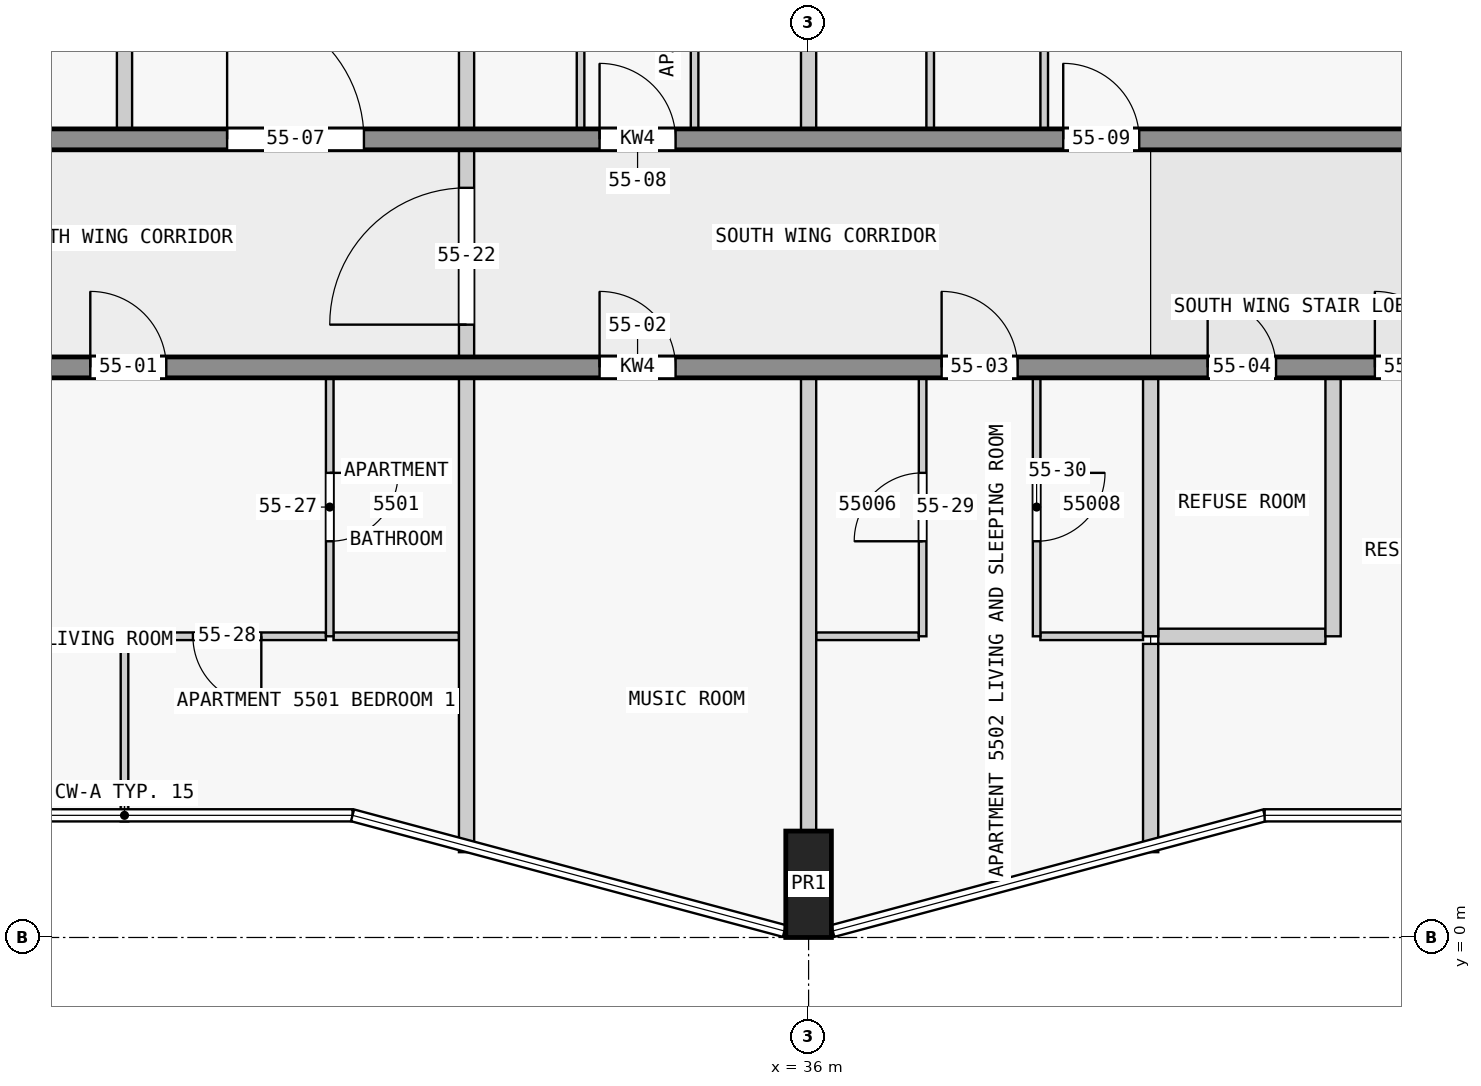
"""IFC4 building model, lengths in metres.
Left out: names, types, materials, properties, quantities, classifications, styles, units other than length and angle.
Written with IfcOpenShell. Run it as: python <this file> out.ifc"""

import sys

from ifc_helpers import new_model, si_unit, direction, frame, frame_2d, origin, origin_2d, place, context, subcontext, project, spatial, rectangle, extrude, element, fill, save


model = new_model("IFC4")
c1 = context("Model", 3, precision=1e-05, world=origin(), true_north=direction((0.0, 1.0)))
c2 = subcontext(c1, "Body", "Model", "MODEL_VIEW")
j1 = project(units=[si_unit("LENGTHUNIT", "METRE"), si_unit("PLANEANGLEUNIT", "RADIAN")], contexts=[c1])
p1 = place(None, origin())
s1 = spatial("IfcSite", under=j1, at=p1, CompositionType="ELEMENT")
p2 = place(p1, origin())
s2 = spatial("IfcBuilding", under=s1, at=p2, CompositionType="ELEMENT")
p3 = place(p2, frame((0.0, 0.0, 211.9)))
s3 = spatial("IfcBuildingStorey", under=s2, at=p3, CompositionType="ELEMENT", Elevation=211.9)
p4 = place(p3, frame((36.0, 0.7, 0.0), z_axis=(0.0, 0.0, 1.0), x_axis=(1.0, 0.0, 0.0)))
e1 = element("IfcColumn", 1, at=p4, inside=s3, PredefinedType="COLUMN", context=c2, shape_type="SweptSolid", body=[
    extrude(rectangle(XDim=0.6, YDim=1.4, at=origin_2d()), origin(), (0.0, 0.0, 1.0), 3.5),
])
p5 = place(p3, frame((22.5, 7.5, 0.0), z_axis=(0.0, 0.0, 1.0), x_axis=(1.0, 0.0, 0.0)))
e2 = element("IfcWall", 2, at=p5, inside=s3, PredefinedType="SHEAR", context=c2, shape_type="SweptSolid", body=[
    extrude(rectangle(XDim=22.5, YDim=0.275, at=frame_2d((11.25, 0.0))), origin(), (0.0, 0.0, 1.0), 3.25),
])
p6 = place(p5, frame((4.05, 0.0, 0.0)))
e3 = element("IfcOpeningElement", 3, at=p6, cuts=e2, PredefinedType="OPENING", context=c2, shape_type="SweptSolid", body=[
    extrude(rectangle(XDim=1.0, YDim=2.1, at=frame_2d((0.5, 1.05))), frame((0.0, 0.147, 0.0), z_axis=(0.0, -1.0, 0.0), x_axis=(1.0, 0.0, 0.0)), (0.0, 0.0, 1.0), 0.295),
])
p7 = place(p5, frame((10.75, 0.0, 0.0)))
e4 = element("IfcOpeningElement", 4, at=p7, cuts=e2, PredefinedType="OPENING", context=c2, shape_type="SweptSolid", body=[
    extrude(rectangle(XDim=1.0, YDim=2.1, at=frame_2d((0.5, 1.05))), frame((0.0, 0.147, 0.0), z_axis=(0.0, -1.0, 0.0), x_axis=(1.0, 0.0, 0.0)), (0.0, 0.0, 1.0), 0.295),
])
p8 = place(p5, frame((15.25, 0.0, 0.0)))
e5 = element("IfcOpeningElement", 5, at=p8, cuts=e2, PredefinedType="OPENING", context=c2, shape_type="SweptSolid", body=[
    extrude(rectangle(XDim=1.0, YDim=2.1, at=frame_2d((0.5, 1.05))), frame((0.0, 0.147, 0.0), z_axis=(0.0, -1.0, 0.0), x_axis=(1.0, 0.0, 0.0)), (0.0, 0.0, 1.0), 0.295),
])
p9 = place(p5, frame((18.75, 0.0, 0.0)))
e6 = element("IfcOpeningElement", 6, at=p9, cuts=e2, PredefinedType="OPENING", context=c2, shape_type="SweptSolid", body=[
    extrude(rectangle(XDim=0.9, YDim=2.1, at=frame_2d((0.45, 1.05))), frame((0.0, 0.147, 0.0), z_axis=(0.0, -1.0, 0.0), x_axis=(1.0, 0.0, 0.0)), (0.0, 0.0, 1.0), 0.295),
])
p10 = place(p5, frame((20.95, 0.0, 0.0)))
e7 = element("IfcOpeningElement", 7, at=p10, cuts=e2, PredefinedType="OPENING", context=c2, shape_type="SweptSolid", body=[
    extrude(rectangle(XDim=1.0, YDim=2.1, at=frame_2d((0.5, 1.05))), frame((0.0, 0.147, 0.0), z_axis=(0.0, -1.0, 0.0), x_axis=(1.0, 0.0, 0.0)), (0.0, 0.0, 1.0), 0.295),
])
p11 = place(p3, frame((22.5, 10.5, 0.0), z_axis=(0.0, 0.0, 1.0), x_axis=(1.0, 0.0, 0.0)))
e8 = element("IfcWall", 8, at=p11, inside=s3, PredefinedType="SHEAR", context=c2, shape_type="SweptSolid", body=[
    extrude(rectangle(XDim=22.5, YDim=0.275, at=frame_2d((11.25, 0.0))), origin(), (0.0, 0.0, 1.0), 3.25),
])
p12 = place(p11, frame((1.75, 0.0, 0.0)))
e9 = element("IfcOpeningElement", 9, at=p12, cuts=e8, PredefinedType="OPENING", context=c2, shape_type="SweptSolid", body=[
    extrude(rectangle(XDim=1.0, YDim=2.1, at=frame_2d((0.5, 1.05))), frame((0.0, 0.147, 0.0), z_axis=(0.0, -1.0, 0.0), x_axis=(1.0, 0.0, 0.0)), (0.0, 0.0, 1.0), 0.295),
])
p13 = place(p11, frame((5.85, 0.0, 0.0)))
e10 = element("IfcOpeningElement", 10, at=p13, cuts=e8, PredefinedType="OPENING", context=c2, shape_type="SweptSolid", body=[
    extrude(rectangle(XDim=1.8, YDim=2.1, at=frame_2d((0.9, 1.05))), frame((0.0, 0.147, 0.0), z_axis=(0.0, -1.0, 0.0), x_axis=(1.0, 0.0, 0.0)), (0.0, 0.0, 1.0), 0.295),
])
p14 = place(p11, frame((10.75, 0.0, 0.0)))
e11 = element("IfcOpeningElement", 11, at=p14, cuts=e8, PredefinedType="OPENING", context=c2, shape_type="SweptSolid", body=[
    extrude(rectangle(XDim=1.0, YDim=2.1, at=frame_2d((0.5, 1.05))), frame((0.0, 0.147, 0.0), z_axis=(0.0, -1.0, 0.0), x_axis=(1.0, 0.0, 0.0)), (0.0, 0.0, 1.0), 0.295),
])
p15 = place(p11, frame((16.85, 0.0, 0.0)))
e12 = element("IfcOpeningElement", 12, at=p15, cuts=e8, PredefinedType="OPENING", context=c2, shape_type="SweptSolid", body=[
    extrude(rectangle(XDim=1.0, YDim=2.1, at=frame_2d((0.5, 1.05))), frame((0.0, 0.147, 0.0), z_axis=(0.0, -1.0, 0.0), x_axis=(1.0, 0.0, 0.0)), (0.0, 0.0, 1.0), 0.295),
])
p16 = place(p3, frame((29.65, 3.962, 0.0), z_axis=(0.0, 0.0, 1.0), x_axis=(-1.0, 0.0, 0.0)))
e13 = element("IfcWall", 13, at=p16, inside=s3, PredefinedType="PARTITIONING", context=c2, shape_type="SweptSolid", body=[
    extrude(rectangle(XDim=2.65, YDim=0.1, at=frame_2d((1.325, 0.0))), origin(), (0.0, 0.0, 1.0), 3.25),
])
p17 = place(p16, frame((0.85, 0.0, 0.0)))
e14 = element("IfcOpeningElement", 14, at=p17, cuts=e13, PredefinedType="OPENING", context=c2, shape_type="SweptSolid", body=[
    extrude(rectangle(XDim=0.9, YDim=2.1, at=frame_2d((0.45, 1.05))), frame((0.0, 0.06, 0.0), z_axis=(0.0, -1.0, 0.0), x_axis=(1.0, 0.0, 0.0)), (0.0, 0.0, 1.0), 0.12),
])
p18 = place(p3, frame((29.75, 3.962, 0.0), z_axis=(0.0, 0.0, 1.0), x_axis=(1.0, 0.0, 0.0)))
e15 = element("IfcWall", 15, at=p18, inside=s3, PredefinedType="PARTITIONING", context=c2, shape_type="SweptSolid", body=[
    extrude(rectangle(XDim=1.65, YDim=0.1, at=frame_2d((0.825, 0.0))), origin(), (0.0, 0.0, 1.0), 3.25),
])
for number, where, z_axis, x_axis in (
    (16, (36.1, 3.962, 0.0), (0.0, 0.0, 1.0), (1.0, 0.0, 0.0)),
    (17, (39.05, 3.962, 0.0), (0.0, 0.0, 1.0), (1.0, 0.0, 0.0)),
):
    element("IfcWall", number, at=place(p3, frame(where, z_axis=z_axis, x_axis=x_axis)), inside=s3, PredefinedType="PARTITIONING", context=c2, shape_type="SweptSolid", body=[
        extrude(rectangle(XDim=1.35, YDim=0.1, at=frame_2d((0.675, 0.0))), origin(), (0.0, 0.0, 1.0), 3.25),
    ])
p19 = place(p3, frame((40.6, 3.962, 0.0), z_axis=(0.0, 0.0, 1.0), x_axis=(1.0, 0.0, 0.0)))
e18 = element("IfcWall", 18, at=p19, inside=s3, PredefinedType="PARTITIONING", context=c2, shape_type="SweptSolid", body=[
    extrude(rectangle(XDim=2.2, YDim=0.2, at=frame_2d((1.1, 0.0))), origin(), (0.0, 0.0, 1.0), 3.25),
])
p20 = place(p3, frame((27.0, 3.913, 0.0), z_axis=(0.0, 0.0, 1.0), x_axis=(0.0, -1.0, 0.0)))
e19 = element("IfcWall", 19, at=p20, inside=s3, PredefinedType="PARTITIONING", context=c2, shape_type="SweptSolid", body=[
    extrude(rectangle(XDim=2.386, YDim=0.1, at=frame_2d((1.193, 0.0))), origin(), (0.0, 0.0, 1.0), 3.25),
])
p21 = place(p3, frame((27.0, 10.637, 0.0), z_axis=(0.0, 0.0, 1.0), x_axis=(0.0, 1.0, 0.0)))
e20 = element("IfcWall", 20, at=p21, inside=s3, PredefinedType="PARTITIONING", context=c2, shape_type="SweptSolid", body=[
    extrude(rectangle(XDim=3.4, YDim=0.2, at=frame_2d((1.7, 0.0))), origin(), (0.0, 0.0, 1.0), 3.25),
])
p22 = place(p3, frame((29.7, 7.363, 0.0), z_axis=(0.0, 0.0, 1.0), x_axis=(0.0, -1.0, 0.0)))
e21 = element("IfcWall", 21, at=p22, inside=s3, PredefinedType="PARTITIONING", context=c2, shape_type="SweptSolid", body=[
    extrude(rectangle(XDim=3.4, YDim=0.1, at=frame_2d((1.7, 0.0))), origin(), (0.0, 0.0, 1.0), 3.25),
])
p23 = place(p22, frame((1.25, 0.0, 0.0)))
e22 = element("IfcOpeningElement", 22, at=p23, cuts=e21, PredefinedType="OPENING", context=c2, shape_type="SweptSolid", body=[
    extrude(rectangle(XDim=0.9, YDim=2.1, at=frame_2d((0.45, 1.05))), frame((0.0, 0.06, 0.0), z_axis=(0.0, -1.0, 0.0), x_axis=(1.0, 0.0, 0.0)), (0.0, 0.0, 1.0), 0.12),
])
for number, where, z_axis, x_axis in (
    (23, (31.5, 1.122, 0.0), (0.0, 0.0, 1.0), (0.0, 1.0, 0.0)),
    (24, (31.5, 10.637, 0.0), (0.0, 0.0, 1.0), (0.0, 1.0, 0.0)),
):
    element("IfcWall", number, at=place(p3, frame(where, z_axis=z_axis, x_axis=x_axis)), inside=s3, PredefinedType="PARTITIONING", context=c2, shape_type="SweptSolid", body=[
        extrude(rectangle(XDim=6.24, YDim=0.2, at=frame_2d((3.12, 0.0))), origin(), (0.0, 0.0, 1.0), 3.25),
    ])
p24 = place(p3, frame((33.0, 10.637, 0.0), z_axis=(0.0, 0.0, 1.0), x_axis=(0.0, 1.0, 0.0)))
e25 = element("IfcWall", 25, at=p24, inside=s3, PredefinedType="PARTITIONING", context=c2, shape_type="SweptSolid", body=[
    extrude(rectangle(XDim=3.4, YDim=0.1, at=frame_2d((1.7, 0.0))), origin(), (0.0, 0.0, 1.0), 3.25),
])
p25 = place(p24, frame((1.25, 0.0, 0.0)))
e26 = element("IfcOpeningElement", 26, at=p25, cuts=e25, PredefinedType="OPENING", context=c2, shape_type="SweptSolid", body=[
    extrude(rectangle(XDim=0.9, YDim=2.1, at=frame_2d((0.45, 1.05))), frame((0.0, 0.06, 0.0), z_axis=(0.0, -1.0, 0.0), x_axis=(1.0, 0.0, 0.0)), (0.0, 0.0, 1.0), 0.12),
])
p26 = place(p3, frame((34.5, 13.988, 0.0), z_axis=(0.0, 0.0, 1.0), x_axis=(0.0, -1.0, 0.0)))
e27 = element("IfcWall", 27, at=p26, inside=s3, PredefinedType="PARTITIONING", context=c2, shape_type="SweptSolid", body=[
    extrude(rectangle(XDim=3.35, YDim=0.1, at=frame_2d((1.675, 0.0))), origin(), (0.0, 0.0, 1.0), 3.25),
])
p27 = place(p26, frame((1.25, 0.0, 0.0)))
e28 = element("IfcOpeningElement", 28, at=p27, cuts=e27, PredefinedType="OPENING", context=c2, shape_type="SweptSolid", body=[
    extrude(rectangle(XDim=0.9, YDim=2.1, at=frame_2d((0.45, 1.05))), frame((0.0, 0.06, 0.0), z_axis=(0.0, -1.0, 0.0), x_axis=(1.0, 0.0, 0.0)), (0.0, 0.0, 1.0), 0.12),
])
p28 = place(p3, frame((36.0, 1.4, 0.0), z_axis=(0.0, 0.0, 1.0), x_axis=(0.0, 1.0, 0.0)))
e29 = element("IfcWall", 29, at=p28, inside=s3, PredefinedType="PARTITIONING", context=c2, shape_type="SweptSolid", body=[
    extrude(rectangle(XDim=5.963, YDim=0.2, at=frame_2d((2.981, 0.0))), origin(), (0.0, 0.0, 1.0), 3.25),
])
p29 = place(p3, frame((36.0, 10.637, 0.0), z_axis=(0.0, 0.0, 1.0), x_axis=(0.0, 1.0, 0.0)))
e30 = element("IfcWall", 30, at=p29, inside=s3, PredefinedType="PARTITIONING", context=c2, shape_type="SweptSolid", body=[
    extrude(rectangle(XDim=3.4, YDim=0.2, at=frame_2d((1.7, 0.0))), origin(), (0.0, 0.0, 1.0), 3.25),
])
p30 = place(p3, frame((37.5, 3.962, 0.0), z_axis=(0.0, 0.0, 1.0), x_axis=(0.0, 1.0, 0.0)))
e31 = element("IfcWall", 31, at=p30, inside=s3, PredefinedType="PARTITIONING", context=c2, shape_type="SweptSolid", body=[
    extrude(rectangle(XDim=3.4, YDim=0.1, at=frame_2d((1.7, 0.0))), origin(), (0.0, 0.0, 1.0), 3.25),
])
p31 = place(p30, frame((1.25, 0.0, 0.0)))
e32 = element("IfcOpeningElement", 32, at=p31, cuts=e31, PredefinedType="OPENING", context=c2, shape_type="SweptSolid", body=[
    extrude(rectangle(XDim=0.9, YDim=2.1, at=frame_2d((0.45, 1.05))), frame((0.0, 0.06, 0.0), z_axis=(0.0, -1.0, 0.0), x_axis=(1.0, 0.0, 0.0)), (0.0, 0.0, 1.0), 0.12),
])
p32 = place(p3, frame((37.6, 10.637, 0.0), z_axis=(0.0, 0.0, 1.0), x_axis=(0.0, 1.0, 0.0)))
e33 = element("IfcWall", 33, at=p32, inside=s3, PredefinedType="PARTITIONING", context=c2, shape_type="SweptSolid", body=[
    extrude(rectangle(XDim=3.35, YDim=0.1, at=frame_2d((1.675, 0.0))), origin(), (0.0, 0.0, 1.0), 3.25),
])
p33 = place(p3, frame((39.0, 7.363, 0.0), z_axis=(0.0, 0.0, 1.0), x_axis=(0.0, -1.0, 0.0)))
e34 = element("IfcWall", 34, at=p33, inside=s3, PredefinedType="PARTITIONING", context=c2, shape_type="SweptSolid", body=[
    extrude(rectangle(XDim=3.4, YDim=0.1, at=frame_2d((1.7, 0.0))), origin(), (0.0, 0.0, 1.0), 3.25),
])
p34 = place(p33, frame((1.25, 0.0, 0.0)))
e35 = element("IfcOpeningElement", 35, at=p34, cuts=e34, PredefinedType="OPENING", context=c2, shape_type="SweptSolid", body=[
    extrude(rectangle(XDim=0.9, YDim=2.1, at=frame_2d((0.45, 1.05))), frame((0.0, 0.06, 0.0), z_axis=(0.0, -1.0, 0.0), x_axis=(1.0, 0.0, 0.0)), (0.0, 0.0, 1.0), 0.12),
])
p35 = place(p3, frame((39.1, 10.637, 0.0), z_axis=(0.0, 0.0, 1.0), x_axis=(0.0, 1.0, 0.0)))
e36 = element("IfcWall", 36, at=p35, inside=s3, PredefinedType="PARTITIONING", context=c2, shape_type="SweptSolid", body=[
    extrude(rectangle(XDim=3.35, YDim=0.1, at=frame_2d((1.675, 0.0))), origin(), (0.0, 0.0, 1.0), 3.25),
])
p36 = place(p35, frame((1.25, 0.0, 0.0)))
e37 = element("IfcOpeningElement", 37, at=p36, cuts=e36, PredefinedType="OPENING", context=c2, shape_type="SweptSolid", body=[
    extrude(rectangle(XDim=0.9, YDim=2.1, at=frame_2d((0.45, 1.05))), frame((0.0, 0.06, 0.0), z_axis=(0.0, -1.0, 0.0), x_axis=(1.0, 0.0, 0.0)), (0.0, 0.0, 1.0), 0.12),
])
p37 = place(p3, frame((40.5, 3.863, 0.0), z_axis=(0.0, 0.0, 1.0), x_axis=(0.0, -1.0, 0.0)))
e38 = element("IfcWall", 38, at=p37, inside=s3, PredefinedType="PARTITIONING", context=c2, shape_type="SweptSolid", body=[
    extrude(rectangle(XDim=2.74, YDim=0.2, at=frame_2d((1.37, 0.0))), origin(), (0.0, 0.0, 1.0), 3.25),
])
for number, where, z_axis, x_axis in (
    (39, (40.5, 3.962, 0.0), (0.0, 0.0, 1.0), (0.0, 1.0, 0.0)),
    (40, (42.9, 3.962, 0.0), (0.0, 0.0, 1.0), (0.0, 1.0, 0.0)),
):
    element("IfcWall", number, at=place(p3, frame(where, z_axis=z_axis, x_axis=x_axis)), inside=s3, PredefinedType="PARTITIONING", context=c2, shape_type="SweptSolid", body=[
        extrude(rectangle(XDim=3.4, YDim=0.2, at=frame_2d((1.7, 0.0))), origin(), (0.0, 0.0, 1.0), 3.25),
    ])
p38 = place(p3, frame((31.5, 7.462, 0.0), z_axis=(0.0, 0.0, 1.0), x_axis=(0.0, 1.0, 0.0)))
e41 = element("IfcWall", 41, at=p38, inside=s3, PredefinedType="PARTITIONING", context=c2, shape_type="SweptSolid", body=[
    extrude(rectangle(XDim=3.075, YDim=0.2, at=frame_2d((1.538, 0.0))), origin(), (0.0, 0.0, 1.0), 3.25),
])
p39 = place(p38, frame((0.6, 0.0, 0.0)))
e42 = element("IfcOpeningElement", 42, at=p39, cuts=e41, PredefinedType="OPENING", context=c2, shape_type="SweptSolid", body=[
    extrude(rectangle(XDim=1.8, YDim=2.1, at=frame_2d((0.9, 1.05))), frame((0.0, 0.11, 0.0), z_axis=(0.0, -1.0, 0.0), x_axis=(1.0, 0.0, 0.0)), (0.0, 0.0, 1.0), 0.22),
])
p40 = place(p6, origin())
e43 = element("IfcDoor", 43, at=p40, inside=s3, OperationType="SINGLE_SWING_LEFT", PredefinedType="DOOR", context=c2, shape_type="SweptSolid", body=[
    extrude(rectangle(XDim=1.0, YDim=2.1, at=frame_2d((0.5, 1.05))), frame((0.0, 0.025, 0.0), z_axis=(0.0, -1.0, 0.0), x_axis=(1.0, 0.0, 0.0)), (0.0, 0.0, 1.0), 0.05),
])
fill(e3, e43)
p41 = place(p7, origin())
e44 = element("IfcDoor", 44, at=p41, inside=s3, OperationType="SINGLE_SWING_LEFT", PredefinedType="DOOR", context=c2, shape_type="SweptSolid", body=[
    extrude(rectangle(XDim=1.0, YDim=2.1, at=frame_2d((0.5, 1.05))), frame((0.0, 0.025, 0.0), z_axis=(0.0, -1.0, 0.0), x_axis=(1.0, 0.0, 0.0)), (0.0, 0.0, 1.0), 0.05),
])
fill(e4, e44)
p42 = place(p8, origin())
e45 = element("IfcDoor", 45, at=p42, inside=s3, OperationType="SINGLE_SWING_RIGHT", PredefinedType="DOOR", context=c2, shape_type="SweptSolid", body=[
    extrude(rectangle(XDim=1.0, YDim=2.1, at=frame_2d((0.5, 1.05))), frame((0.0, 0.025, 0.0), z_axis=(0.0, -1.0, 0.0), x_axis=(1.0, 0.0, 0.0)), (0.0, 0.0, 1.0), 0.05),
])
fill(e5, e45)
p43 = place(p9, origin())
e46 = element("IfcDoor", 46, at=p43, inside=s3, OperationType="SINGLE_SWING_RIGHT", PredefinedType="DOOR", context=c2, shape_type="SweptSolid", body=[
    extrude(rectangle(XDim=0.9, YDim=2.1, at=frame_2d((0.45, 1.05))), frame((0.0, 0.025, 0.0), z_axis=(0.0, -1.0, 0.0), x_axis=(1.0, 0.0, 0.0)), (0.0, 0.0, 1.0), 0.05),
])
fill(e6, e46)
p44 = place(p10, origin())
e47 = element("IfcDoor", 47, at=p44, inside=s3, OperationType="SINGLE_SWING_RIGHT", PredefinedType="DOOR", context=c2, shape_type="SweptSolid", body=[
    extrude(rectangle(XDim=1.0, YDim=2.1, at=frame_2d((0.5, 1.05))), frame((0.0, 0.025, 0.0), z_axis=(0.0, -1.0, 0.0), x_axis=(1.0, 0.0, 0.0)), (0.0, 0.0, 1.0), 0.05),
])
fill(e7, e47)
p45 = place(p13, origin())
e48 = element("IfcDoor", 48, at=p45, inside=s3, OperationType="SINGLE_SWING_LEFT", PredefinedType="DOOR", context=c2, shape_type="SweptSolid", body=[
    extrude(rectangle(XDim=1.8, YDim=2.1, at=frame_2d((0.9, 1.05))), frame((0.0, 0.025, 0.0), z_axis=(0.0, -1.0, 0.0), x_axis=(1.0, 0.0, 0.0)), (0.0, 0.0, 1.0), 0.05),
])
fill(e10, e48)
p46 = place(p14, origin())
e49 = element("IfcDoor", 49, at=p46, inside=s3, OperationType="SINGLE_SWING_LEFT", PredefinedType="DOOR", context=c2, shape_type="SweptSolid", body=[
    extrude(rectangle(XDim=1.0, YDim=2.1, at=frame_2d((0.5, 1.05))), frame((0.0, 0.025, 0.0), z_axis=(0.0, -1.0, 0.0), x_axis=(1.0, 0.0, 0.0)), (0.0, 0.0, 1.0), 0.05),
])
fill(e11, e49)
p47 = place(p15, origin())
e50 = element("IfcDoor", 50, at=p47, inside=s3, OperationType="SINGLE_SWING_RIGHT", PredefinedType="DOOR", context=c2, shape_type="SweptSolid", body=[
    extrude(rectangle(XDim=1.0, YDim=2.1, at=frame_2d((0.5, 1.05))), frame((0.0, 0.025, 0.0), z_axis=(0.0, -1.0, 0.0), x_axis=(1.0, 0.0, 0.0)), (0.0, 0.0, 1.0), 0.05),
])
fill(e12, e50)
p48 = place(p39, origin())
e51 = element("IfcDoor", 51, at=p48, inside=s3, OperationType="SINGLE_SWING_LEFT", PredefinedType="DOOR", context=c2, shape_type="SweptSolid", body=[
    extrude(rectangle(XDim=1.8, YDim=2.1, at=frame_2d((0.9, 1.05))), frame((0.0, 0.025, 0.0), z_axis=(0.0, -1.0, 0.0), x_axis=(1.0, 0.0, 0.0)), (0.0, 0.0, 1.0), 0.05),
])
fill(e42, e51)
p49 = place(p23, origin())
e52 = element("IfcDoor", 52, at=p49, inside=s3, OperationType="SINGLE_SWING_LEFT", PredefinedType="DOOR", context=c2, shape_type="SweptSolid", body=[
    extrude(rectangle(XDim=0.9, YDim=2.1, at=frame_2d((0.45, 1.05))), frame((0.0, 0.025, 0.0), z_axis=(0.0, -1.0, 0.0), x_axis=(1.0, 0.0, 0.0)), (0.0, 0.0, 1.0), 0.05),
])
fill(e22, e52)
p50 = place(p17, origin())
e53 = element("IfcDoor", 53, at=p50, inside=s3, OperationType="SINGLE_SWING_LEFT", PredefinedType="DOOR", context=c2, shape_type="SweptSolid", body=[
    extrude(rectangle(XDim=0.9, YDim=2.1, at=frame_2d((0.45, 1.05))), frame((0.0, 0.025, 0.0), z_axis=(0.0, -1.0, 0.0), x_axis=(1.0, 0.0, 0.0)), (0.0, 0.0, 1.0), 0.05),
])
fill(e14, e53)
p51 = place(p31, origin())
e54 = element("IfcDoor", 54, at=p51, inside=s3, OperationType="SINGLE_SWING_LEFT", PredefinedType="DOOR", context=c2, shape_type="SweptSolid", body=[
    extrude(rectangle(XDim=0.9, YDim=2.1, at=frame_2d((0.45, 1.05))), frame((0.0, 0.025, 0.0), z_axis=(0.0, -1.0, 0.0), x_axis=(1.0, 0.0, 0.0)), (0.0, 0.0, 1.0), 0.05),
])
fill(e32, e54)
p52 = place(p34, origin())
e55 = element("IfcDoor", 55, at=p52, inside=s3, OperationType="SINGLE_SWING_LEFT", PredefinedType="DOOR", context=c2, shape_type="SweptSolid", body=[
    extrude(rectangle(XDim=0.9, YDim=2.1, at=frame_2d((0.45, 1.05))), frame((0.0, 0.025, 0.0), z_axis=(0.0, -1.0, 0.0), x_axis=(1.0, 0.0, 0.0)), (0.0, 0.0, 1.0), 0.05),
])
fill(e35, e55)
save(model, sys.argv[1])
